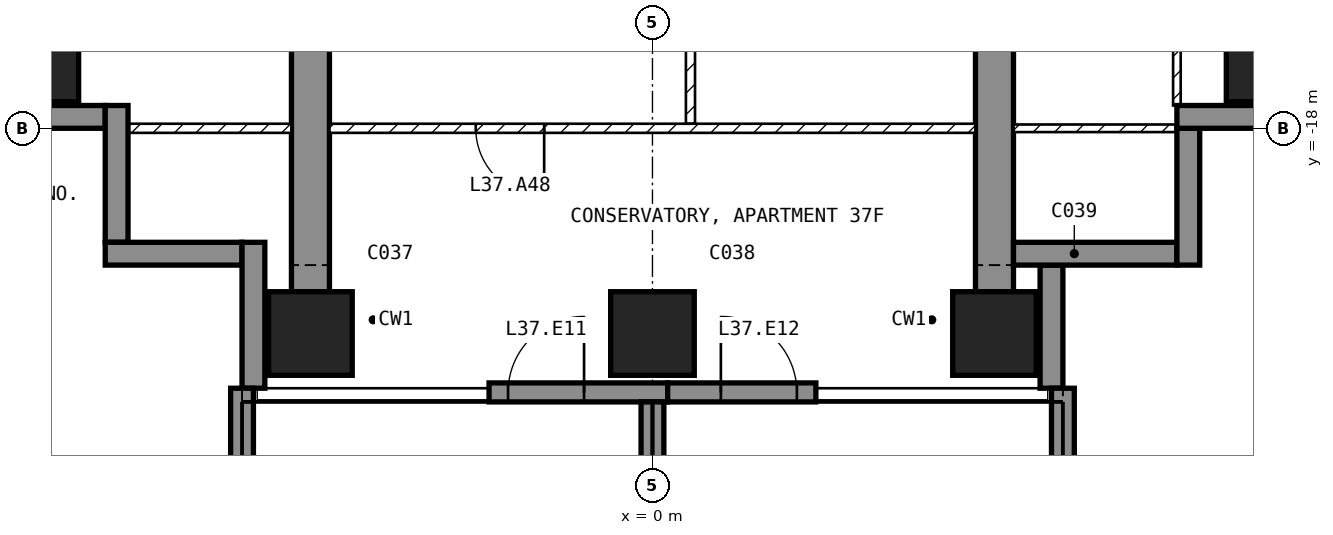
"""IFC4 building model, lengths in metres.
Left out: names, types, materials, properties, quantities, classifications, styles, units other than length and angle.
Written with IfcOpenShell. Run it as: python <this file> out.ifc"""

import sys

from ifc_helpers import new_model, si_unit, direction, frame, frame_2d, origin, origin_2d, place, context, subcontext, project, spatial, polyline, rectangle, outline, extrude, element, fill, save


model = new_model("IFC4")
c1 = context("Model", 3, precision=1e-05, world=origin(), true_north=direction((0.0, 1.0)))
c2 = subcontext(c1, "Body", "Model", "MODEL_VIEW")
j1 = project(units=[si_unit("LENGTHUNIT", "METRE"), si_unit("PLANEANGLEUNIT", "RADIAN")], contexts=[c1])
p1 = place(None, origin())
s1 = spatial("IfcSite", under=j1, at=p1, CompositionType="ELEMENT")
p2 = place(p1, origin())
s2 = spatial("IfcBuilding", under=s1, at=p2, CompositionType="ELEMENT")
p3 = place(p2, frame((0.0, 0.0, 151.4)))
s3 = spatial("IfcBuildingStorey", under=s2, at=p3, CompositionType="ELEMENT", Elevation=151.4)
for number, where, z_axis, x_axis in (
    (1, (-8.1, -17.1, -0.25), (0.0, 0.0, 1.0), (1.0, 0.0, 0.0)),
    (2, (-4.5, -20.7, -0.25), (0.0, 0.0, 1.0), (1.0, 0.0, 0.0)),
    (3, (0.0, -20.7, -0.25), (0.0, 0.0, 1.0), (1.0, 0.0, 0.0)),
    (4, (4.5, -20.7, -0.25), (0.0, 0.0, 1.0), (1.0, 0.0, 0.0)),
    (5, (8.1, -17.1, -0.25), (0.0, 0.0, 1.0), (1.0, 0.0, 0.0)),
):
    element("IfcColumn", number, at=place(p3, frame(where, z_axis=z_axis, x_axis=x_axis)), inside=s3, PredefinedType="COLUMN", context=c2, shape_type="SweptSolid", body=[
        extrude(rectangle(XDim=1.1, YDim=1.1, at=origin_2d()), origin(), (0.0, 0.0, 1.0), 3.45),
    ])
for number, where, z_axis, x_axis in (
    (6, (-4.75, -20.15, -0.25), (1.0, 0.0, 0.0), (0.0, 1.0, 0.0)),
    (7, (4.25, -20.15, -0.25), (1.0, 0.0, 0.0), (0.0, 1.0, 0.0)),
):
    element("IfcWall", number, at=place(p3, frame(where, z_axis=z_axis, x_axis=x_axis)), inside=s3, PredefinedType="SHEAR", context=c2, shape_type="SweptSolid", body=[
        extrude(outline(polyline([(0.0, 0.0), (6.65, 0.0), (6.65, 2.65), (9.05, 2.65), (9.05, 0.0), (11.15, 0.0), (11.15, 3.45), (0.0, 3.45), (0.0, 0.0)])), origin(), (0.0, 0.0, 1.0), 0.5),
    ])
p4 = place(p3, frame((-2.15, -21.475, 0.0), z_axis=(0.0, 0.0, 1.0), x_axis=(1.0, 0.0, 0.0)))
e8 = element("IfcWall", 8, at=p4, inside=s3, PredefinedType="SOLIDWALL", context=c2, shape_type="SweptSolid", body=[
    extrude(rectangle(XDim=2.35, YDim=0.25, at=frame_2d((1.175, 0.0))), origin(), (0.0, 0.0, 1.0), 3.2),
])
p5 = place(p4, frame((0.25, 0.0, 0.0)))
e9 = element("IfcOpeningElement", 9, at=p5, cuts=e8, PredefinedType="OPENING", context=c2, shape_type="SweptSolid", body=[
    extrude(rectangle(XDim=1.0, YDim=2.4, at=frame_2d((0.5, 1.2))), frame((0.0, 0.135, 0.0), z_axis=(0.0, -1.0, 0.0), x_axis=(1.0, 0.0, 0.0)), (0.0, 0.0, 1.0), 0.27),
])
p6 = place(p3, frame((0.2, -21.475, 0.0), z_axis=(0.0, 0.0, 1.0), x_axis=(1.0, 0.0, 0.0)))
e10 = element("IfcWall", 10, at=p6, inside=s3, PredefinedType="SOLIDWALL", context=c2, shape_type="SweptSolid", body=[
    extrude(rectangle(XDim=1.95, YDim=0.25, at=frame_2d((0.975, 0.0))), origin(), (0.0, 0.0, 1.0), 3.2),
])
p7 = place(p6, frame((0.7, 0.0, 0.0)))
e11 = element("IfcOpeningElement", 11, at=p7, cuts=e10, PredefinedType="OPENING", context=c2, shape_type="SweptSolid", body=[
    extrude(rectangle(XDim=1.0, YDim=2.4, at=frame_2d((0.5, 1.2))), frame((0.0, 0.135, 0.0), z_axis=(0.0, -1.0, 0.0), x_axis=(1.0, 0.0, 0.0)), (0.0, 0.0, 1.0), 0.27),
])
p8 = place(p3, frame((5.25, -21.42, 0.0), z_axis=(0.0, 0.0, 1.0), x_axis=(0.0, 1.0, 0.0)))
e12 = element("IfcWall", 12, at=p8, inside=s3, PredefinedType="SOLIDWALL", context=c2, shape_type="SweptSolid", body=[
    extrude(rectangle(XDim=1.62, YDim=0.3, at=frame_2d((0.81, 0.0))), origin(), (0.0, 0.0, 1.0), 3.2),
])
p9 = place(p3, frame((4.75, -19.65, 0.0), z_axis=(0.0, 0.0, 1.0), x_axis=(1.0, 0.0, 0.0)))
e13 = element("IfcWall", 13, at=p9, inside=s3, PredefinedType="SOLIDWALL", context=c2, shape_type="SweptSolid", body=[
    extrude(rectangle(XDim=2.15, YDim=0.3, at=frame_2d((1.075, 0.0))), origin(), (0.0, 0.0, 1.0), 3.2),
])
p10 = place(p3, frame((7.05, -19.8, 0.0), z_axis=(0.0, 0.0, 1.0), x_axis=(0.0, 1.0, 0.0)))
e14 = element("IfcWall", 14, at=p10, inside=s3, PredefinedType="SOLIDWALL", context=c2, shape_type="SweptSolid", body=[
    extrude(rectangle(XDim=1.8, YDim=0.3, at=frame_2d((0.9, 0.0))), origin(), (0.0, 0.0, 1.0), 3.2),
])
p11 = place(p3, frame((6.9, -17.85, 0.0), z_axis=(0.0, 0.0, 1.0), x_axis=(1.0, 0.0, 0.0)))
e15 = element("IfcWall", 15, at=p11, inside=s3, PredefinedType="SOLIDWALL", context=c2, shape_type="SweptSolid", body=[
    extrude(rectangle(XDim=1.85, YDim=0.3, at=frame_2d((0.925, 0.0))), origin(), (0.0, 0.0, 1.0), 3.2),
])
p12 = place(p3, frame((-8.75, -17.85, 0.0), z_axis=(0.0, 0.0, 1.0), x_axis=(1.0, 0.0, 0.0)))
e16 = element("IfcWall", 16, at=p12, inside=s3, PredefinedType="SOLIDWALL", context=c2, shape_type="SweptSolid", body=[
    extrude(rectangle(XDim=1.55, YDim=0.3, at=frame_2d((0.775, 0.0))), origin(), (0.0, 0.0, 1.0), 3.2),
])
for number, where, z_axis, x_axis in (
    (17, (-7.05, -17.7, 0.0), (0.0, 0.0, 1.0), (0.0, -1.0, 0.0)),
    (18, (-7.2, -19.65, 0.0), (0.0, 0.0, 1.0), (1.0, 0.0, 0.0)),
):
    element("IfcWall", number, at=place(p3, frame(where, z_axis=z_axis, x_axis=x_axis)), inside=s3, PredefinedType="SOLIDWALL", context=c2, shape_type="SweptSolid", body=[
        extrude(rectangle(XDim=1.8, YDim=0.3, at=frame_2d((0.9, 0.0))), origin(), (0.0, 0.0, 1.0), 3.2),
    ])
p13 = place(p3, frame((-5.25, -19.5, 0.0), z_axis=(0.0, 0.0, 1.0), x_axis=(0.0, -1.0, 0.0)))
e19 = element("IfcWall", 19, at=p13, inside=s3, PredefinedType="SOLIDWALL", context=c2, shape_type="SweptSolid", body=[
    extrude(rectangle(XDim=1.92, YDim=0.3, at=frame_2d((0.96, 0.0))), origin(), (0.0, 0.0, 1.0), 3.2),
])
p14 = place(p3, frame((-5.4, -21.42, 0.0), z_axis=(0.0, 0.0, 1.0), x_axis=(0.0, -1.0, 0.0)))
e20 = element("IfcWall", 20, at=p14, inside=s3, PredefinedType="SOLIDWALL", context=c2, shape_type="SweptSolid", body=[
    extrude(rectangle(XDim=2.88, YDim=0.3, at=frame_2d((1.44, 0.0))), origin(), (0.0, 0.0, 1.0), 3.2),
])
p15 = place(p3, frame((0.0, -21.6, 0.0), z_axis=(0.0, 0.0, 1.0), x_axis=(0.0, -1.0, 0.0)))
e21 = element("IfcWall", 21, at=p15, inside=s3, PredefinedType="SOLIDWALL", context=c2, shape_type="SweptSolid", body=[
    extrude(rectangle(XDim=2.7, YDim=0.3, at=frame_2d((1.35, 0.0))), origin(), (0.0, 0.0, 1.0), 3.2),
])
p16 = place(p3, frame((5.4, -21.42, 0.0), z_axis=(0.0, 0.0, 1.0), x_axis=(0.0, -1.0, 0.0)))
e22 = element("IfcWall", 22, at=p16, inside=s3, PredefinedType="SOLIDWALL", context=c2, shape_type="SweptSolid", body=[
    extrude(rectangle(XDim=2.88, YDim=0.3, at=frame_2d((1.44, 0.0))), origin(), (0.0, 0.0, 1.0), 3.2),
])
p17 = place(p3, frame((0.5, -15.06, 0.0), z_axis=(0.0, 0.0, 1.0), x_axis=(0.0, -1.0, 0.0)))
e23 = element("IfcWall", 23, at=p17, inside=s3, PredefinedType="PARTITIONING", context=c2, shape_type="SweptSolid", body=[
    extrude(rectangle(XDim=2.88, YDim=0.12, at=frame_2d((1.44, 0.0))), origin(), (0.0, 0.0, 1.0), 3.2),
])
p18 = place(p3, frame((4.25, -18.0, 0.0), z_axis=(0.0, 0.0, 1.0), x_axis=(-1.0, 0.0, 0.0)))
e24 = element("IfcWall", 24, at=p18, inside=s3, PredefinedType="PARTITIONING", context=c2, shape_type="SweptSolid", body=[
    extrude(rectangle(XDim=8.5, YDim=0.12, at=frame_2d((4.25, 0.0))), origin(), (0.0, 0.0, 1.0), 3.2),
])
p19 = place(p18, frame((5.675, 0.0, 0.0)))
e25 = element("IfcOpeningElement", 25, at=p19, cuts=e24, PredefinedType="OPENING", context=c2, shape_type="SweptSolid", body=[
    extrude(rectangle(XDim=0.9, YDim=2.1, at=frame_2d((0.45, 1.05))), frame((0.0, 0.07, 0.0), z_axis=(0.0, -1.0, 0.0), x_axis=(1.0, 0.0, 0.0)), (0.0, 0.0, 1.0), 0.14),
])
p20 = place(p3, frame((6.9, -17.7, 0.0), z_axis=(0.0, 0.0, 1.0), x_axis=(0.0, 1.0, 0.0)))
e26 = element("IfcWall", 26, at=p20, inside=s3, PredefinedType="PARTITIONING", context=c2, shape_type="SweptSolid", body=[
    extrude(rectangle(XDim=3.25, YDim=0.1, at=frame_2d((1.625, 0.0))), origin(), (0.0, 0.0, 1.0), 3.2),
])
p21 = place(p20, frame((2.2, 0.0, 0.0)))
e27 = element("IfcOpeningElement", 27, at=p21, cuts=e26, PredefinedType="OPENING", context=c2, shape_type="SweptSolid", body=[
    extrude(rectangle(XDim=0.85, YDim=2.1, at=frame_2d((0.425, 1.05))), frame((0.0, 0.06, 0.0), z_axis=(0.0, -1.0, 0.0), x_axis=(1.0, 0.0, 0.0)), (0.0, 0.0, 1.0), 0.12),
])
p22 = place(p3, frame((7.12, -18.0, 0.0), z_axis=(0.0, 0.0, 1.0), x_axis=(-1.0, 0.0, 0.0)))
e28 = element("IfcWall", 28, at=p22, inside=s3, PredefinedType="PARTITIONING", context=c2, shape_type="SweptSolid", body=[
    extrude(rectangle(XDim=2.37, YDim=0.1, at=frame_2d((1.185, 0.0))), origin(), (0.0, 0.0, 1.0), 3.2),
])
p23 = place(p3, frame((-4.75, -18.0, 0.0), z_axis=(0.0, 0.0, 1.0), x_axis=(-1.0, 0.0, 0.0)))
e29 = element("IfcWall", 29, at=p23, inside=s3, PredefinedType="PARTITIONING", context=c2, shape_type="SweptSolid", body=[
    extrude(rectangle(XDim=2.37, YDim=0.12, at=frame_2d((1.185, 0.0))), origin(), (0.0, 0.0, 1.0), 3.2),
])
p24 = place(p5, origin())
e30 = element("IfcDoor", 30, at=p24, inside=s3, OperationType="SINGLE_SWING_RIGHT", PredefinedType="DOOR", context=c2, shape_type="SweptSolid", body=[
    extrude(rectangle(XDim=1.0, YDim=2.4, at=frame_2d((0.5, 1.2))), frame((0.0, 0.025, 0.0), z_axis=(0.0, -1.0, 0.0), x_axis=(1.0, 0.0, 0.0)), (0.0, 0.0, 1.0), 0.05),
])
fill(e9, e30)
p25 = place(p7, origin())
e31 = element("IfcDoor", 31, at=p25, inside=s3, OperationType="SINGLE_SWING_LEFT", PredefinedType="DOOR", context=c2, shape_type="SweptSolid", body=[
    extrude(rectangle(XDim=1.0, YDim=2.4, at=frame_2d((0.5, 1.2))), frame((0.0, 0.025, 0.0), z_axis=(0.0, -1.0, 0.0), x_axis=(1.0, 0.0, 0.0)), (0.0, 0.0, 1.0), 0.05),
])
fill(e11, e31)
p26 = place(p19, origin())
e32 = element("IfcDoor", 32, at=p26, inside=s3, OperationType="SINGLE_SWING_LEFT", PredefinedType="DOOR", context=c2, shape_type="SweptSolid", body=[
    extrude(rectangle(XDim=0.9, YDim=2.1, at=frame_2d((0.45, 1.05))), frame((0.0, 0.025, 0.0), z_axis=(0.0, -1.0, 0.0), x_axis=(1.0, 0.0, 0.0)), (0.0, 0.0, 1.0), 0.05),
])
fill(e25, e32)
save(model, sys.argv[1])
